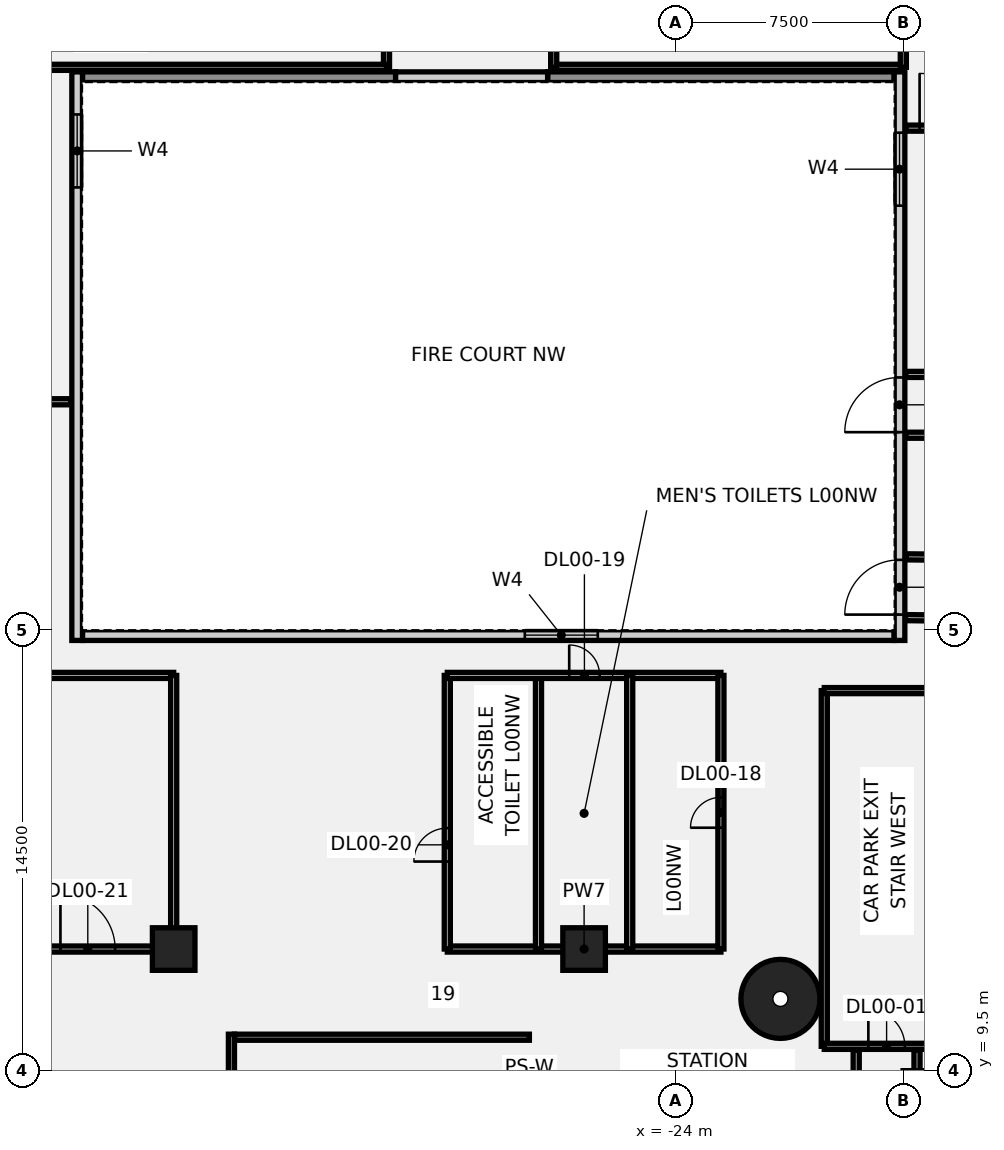
"""IFC4 building model, lengths in metres.
Left out: names, types, materials, properties, quantities, classifications, styles, units other than length and angle.
Written with IfcOpenShell. Run it as: python <this file> out.ifc"""

import sys

from ifc_helpers import new_model, si_unit, direction, frame, frame_2d, origin, origin_2d, place, context, subcontext, project, spatial, rectangle, circle, extrude, element, fill, save


model = new_model("IFC4")
c1 = context("Model", 3, precision=1e-05, world=origin(), true_north=direction((0.0, 1.0)))
c2 = subcontext(c1, "Body", "Model", "MODEL_VIEW")
j1 = project(units=[si_unit("LENGTHUNIT", "METRE"), si_unit("PLANEANGLEUNIT", "RADIAN")], contexts=[c1])
p1 = place(None, origin())
s1 = spatial("IfcSite", under=j1, at=p1, CompositionType="ELEMENT")
p2 = place(p1, origin())
s2 = spatial("IfcBuilding", under=s1, at=p2, CompositionType="ELEMENT")
p3 = place(p2, origin())
s3 = spatial("IfcBuildingStorey", under=s2, at=p3, CompositionType="ELEMENT", Elevation=0.0)
p4 = place(p3, frame((-20.543, 11.86, -0.55), z_axis=(0.0, 0.0, 1.0), x_axis=(1.0, 0.0, 0.0)))
e1 = element("IfcColumn", 1, at=p4, inside=s3, PredefinedType="COLUMN", context=c2, shape_type="SweptSolid", body=[
    extrude(circle(Radius=1.3, at=origin_2d()), origin(), (0.0, 0.0, 1.0), 9.05),
])
for number, where, z_axis, x_axis in (
    (2, (-40.5, 13.5, -0.55), (0.0, 0.0, 1.0), (1.0, 0.0, 0.0)),
    (3, (-27.0, 13.5, -0.55), (0.0, 0.0, 1.0), (1.0, 0.0, 0.0)),
):
    element("IfcColumn", number, at=place(p3, frame(where, z_axis=z_axis, x_axis=x_axis)), inside=s3, PredefinedType="COLUMN", context=c2, shape_type="SweptSolid", body=[
        extrude(rectangle(XDim=1.4, YDim=1.4, at=origin_2d()), origin(), (0.0, 0.0, 1.0), 9.05),
    ])
p5 = place(p3, frame((-33.5, 42.5, 0.0), z_axis=(0.0, 0.0, 1.0), x_axis=(0.0, 1.0, 0.0)))
e4 = element("IfcWall", 4, at=p5, inside=s3, PredefinedType="PARTITIONING", context=c2, shape_type="SweptSolid", body=[
    extrude(rectangle(XDim=3.9, YDim=0.2, at=frame_2d((1.95, 0.0))), origin(), (0.0, 0.0, 1.0), 8.5),
])
p6 = place(p3, frame((-45.0, 42.5, 0.0), z_axis=(0.0, 0.0, 1.0), x_axis=(1.0, 0.0, 0.0)))
e5 = element("IfcWall", 5, at=p6, inside=s3, PredefinedType="PARTITIONING", context=c2, shape_type="SweptSolid", body=[
    extrude(rectangle(XDim=11.5, YDim=0.2, at=frame_2d((5.75, 0.0))), origin(), (0.0, 0.0, 1.0), 8.5),
])
p7 = place(p3, frame((-19.1, 10.3, 0.0), z_axis=(0.0, 0.0, 1.0), x_axis=(0.0, 1.0, 0.0)))
e6 = element("IfcWall", 6, at=p7, inside=s3, PredefinedType="PARTITIONING", context=c2, shape_type="SweptSolid", body=[
    extrude(rectangle(XDim=11.7, YDim=0.2, at=frame_2d((5.85, 0.0))), origin(), (0.0, 0.0, 1.0), 8.5),
])
p8 = place(p3, frame((-19.1, 22.0, 0.0), z_axis=(0.0, 0.0, 1.0), x_axis=(1.0, 0.0, 0.0)))
e7 = element("IfcWall", 7, at=p8, inside=s3, PredefinedType="PARTITIONING", context=c2, shape_type="SweptSolid", body=[
    extrude(rectangle(XDim=4.1, YDim=0.2, at=frame_2d((2.05, 0.0))), origin(), (0.0, 0.0, 1.0), 8.5),
])
p9 = place(p3, frame((-19.1, 10.3, 0.0), z_axis=(0.0, 0.0, 1.0), x_axis=(1.0, 0.0, 0.0)))
e8 = element("IfcWall", 8, at=p9, inside=s3, PredefinedType="PARTITIONING", context=c2, shape_type="SweptSolid", body=[
    extrude(rectangle(XDim=4.1, YDim=0.2, at=frame_2d((2.05, 0.0))), origin(), (0.0, 0.0, 1.0), 8.5),
])
p10 = place(p9, frame((1.45, 0.0, 0.0)))
e9 = element("IfcOpeningElement", 9, at=p10, cuts=e8, PredefinedType="OPENING", context=c2, shape_type="SweptSolid", body=[
    extrude(rectangle(XDim=1.2, YDim=2.1, at=frame_2d((0.6, 1.05))), frame((0.0, 0.11, 0.0), z_axis=(0.0, -1.0, 0.0), x_axis=(1.0, 0.0, 0.0)), (0.0, 0.0, 1.0), 0.22),
])
p11 = place(p3, frame((-28.0, 42.5, 0.0), z_axis=(0.0, 0.0, 1.0), x_axis=(1.0, 0.0, 0.0)))
e10 = element("IfcWall", 10, at=p11, inside=s3, PredefinedType="PARTITIONING", context=c2, shape_type="SweptSolid", body=[
    extrude(rectangle(XDim=11.5, YDim=0.2, at=frame_2d((5.75, 0.0))), origin(), (0.0, 0.0, 1.0), 8.5),
])
for number, where, z_axis, x_axis in (
    (11, (-28.0, 42.5, 0.0), (0.0, 0.0, 1.0), (0.0, 1.0, 0.0)),
    (12, (-16.5, 42.5, 0.0), (0.0, 0.0, 1.0), (0.0, 1.0, 0.0)),
):
    element("IfcWall", number, at=place(p3, frame(where, z_axis=z_axis, x_axis=x_axis)), inside=s3, PredefinedType="PARTITIONING", context=c2, shape_type="SweptSolid", body=[
        extrude(rectangle(XDim=3.9, YDim=0.2, at=frame_2d((1.95, 0.0))), origin(), (0.0, 0.0, 1.0), 8.5),
    ])
p12 = place(p3, frame((-69.699, 13.5, 0.0), z_axis=(0.0, 0.0, 1.0), x_axis=(1.0, 0.0, 0.0)))
e13 = element("IfcWall", 13, at=p12, inside=s3, PredefinedType="PARTITIONING", context=c2, shape_type="SweptSolid", body=[
    extrude(rectangle(XDim=29.199, YDim=0.2, at=frame_2d((14.6, 0.0))), origin(), (0.0, 0.0, 1.0), 8.5),
])
p13 = place(p12, frame((25.474, 0.0, 0.0)))
e14 = element("IfcOpeningElement", 14, at=p13, cuts=e13, PredefinedType="OPENING", context=c2, shape_type="SweptSolid", body=[
    extrude(rectangle(XDim=1.8, YDim=2.1, at=frame_2d((0.9, 1.05))), frame((0.0, 0.11, 0.0), z_axis=(0.0, -1.0, 0.0), x_axis=(1.0, 0.0, 0.0)), (0.0, 0.0, 1.0), 0.22),
])
p14 = place(p12, frame((4.699, 0.0, 0.0)))
e15 = element("IfcOpeningElement", 15, at=p14, cuts=e13, PredefinedType="OPENING", context=c2, shape_type="SweptSolid", body=[
    extrude(rectangle(XDim=1.8, YDim=2.1, at=frame_2d((0.9, 1.05))), frame((0.0, 0.11, 0.0), z_axis=(0.0, -1.0, 0.0), x_axis=(1.0, 0.0, 0.0)), (0.0, 0.0, 1.0), 0.22),
])
p15 = place(p3, frame((-69.699, 31.5, 0.0), z_axis=(0.0, 0.0, 1.0), x_axis=(1.0, 0.0, 0.0)))
e16 = element("IfcWall", 16, at=p15, inside=s3, PredefinedType="PARTITIONING", context=c2, shape_type="SweptSolid", body=[
    extrude(rectangle(XDim=25.819, YDim=0.2, at=frame_2d((12.91, 0.0))), origin(), (0.0, 0.0, 1.0), 8.5),
])
p16 = place(p15, frame((12.034, 0.0, 0.0)))
e17 = element("IfcOpeningElement", 17, at=p16, cuts=e16, PredefinedType="OPENING", context=c2, shape_type="SweptSolid", body=[
    extrude(rectangle(XDim=1.8, YDim=2.1, at=frame_2d((0.9, 1.05))), frame((0.0, 0.11, 0.0), z_axis=(0.0, -1.0, 0.0), x_axis=(1.0, 0.0, 0.0)), (0.0, 0.0, 1.0), 0.22),
])
p17 = place(p3, frame((-50.6, 22.5, 0.0), z_axis=(0.0, 0.0, 1.0), x_axis=(1.0, 0.0, 0.0)))
e18 = element("IfcWall", 18, at=p17, inside=s3, PredefinedType="PARTITIONING", context=c2, shape_type="SweptSolid", body=[
    extrude(rectangle(XDim=10.1, YDim=0.2, at=frame_2d((5.05, 0.0))), origin(), (0.0, 0.0, 1.0), 8.5),
])
for number, where, z_axis, x_axis in (
    (19, (-40.5, 13.5, 0.0), (0.0, 0.0, 1.0), (0.0, 1.0, 0.0)),
    (20, (-31.5, 13.5, 0.0), (0.0, 0.0, 1.0), (1.0, 0.0, 0.0)),
    (21, (-28.5, 13.5, 0.0), (0.0, 0.0, 1.0), (0.0, 1.0, 0.0)),
):
    element("IfcWall", number, at=place(p3, frame(where, z_axis=z_axis, x_axis=x_axis)), inside=s3, PredefinedType="PARTITIONING", context=c2, shape_type="SweptSolid", body=[
        extrude(rectangle(XDim=9.0, YDim=0.2, at=frame_2d((4.5, 0.0))), origin(), (0.0, 0.0, 1.0), 8.5),
    ])
p18 = place(p3, frame((-31.5, 13.5, 0.0), z_axis=(0.0, 0.0, 1.0), x_axis=(0.0, 1.0, 0.0)))
e22 = element("IfcWall", 22, at=p18, inside=s3, PredefinedType="PARTITIONING", context=c2, shape_type="SweptSolid", body=[
    extrude(rectangle(XDim=9.0, YDim=0.2, at=frame_2d((4.5, 0.0))), origin(), (0.0, 0.0, 1.0), 8.5),
])
p19 = place(p18, frame((2.877, 0.0, 0.0)))
e23 = element("IfcOpeningElement", 23, at=p19, cuts=e22, PredefinedType="OPENING", context=c2, shape_type="SweptSolid", body=[
    extrude(rectangle(XDim=1.1, YDim=2.1, at=frame_2d((0.55, 1.05))), frame((0.0, 0.11, 0.0), z_axis=(0.0, -1.0, 0.0), x_axis=(1.0, 0.0, 0.0)), (0.0, 0.0, 1.0), 0.22),
])
p20 = place(p3, frame((-31.5, 22.5, 0.0), z_axis=(0.0, 0.0, 1.0), x_axis=(1.0, 0.0, 0.0)))
e24 = element("IfcWall", 24, at=p20, inside=s3, PredefinedType="PARTITIONING", context=c2, shape_type="SweptSolid", body=[
    extrude(rectangle(XDim=9.0, YDim=0.2, at=frame_2d((4.5, 0.0))), origin(), (0.0, 0.0, 1.0), 8.5),
])
p21 = place(p20, frame((4.01, 0.0, 0.0)))
e25 = element("IfcOpeningElement", 25, at=p21, cuts=e24, PredefinedType="OPENING", context=c2, shape_type="SweptSolid", body=[
    extrude(rectangle(XDim=1.0, YDim=2.1, at=frame_2d((0.5, 1.05))), frame((0.0, 0.11, 0.0), z_axis=(0.0, -1.0, 0.0), x_axis=(1.0, 0.0, 0.0)), (0.0, 0.0, 1.0), 0.22),
])
p22 = place(p3, frame((-22.5, 13.5, 0.0), z_axis=(0.0, 0.0, 1.0), x_axis=(0.0, 1.0, 0.0)))
e26 = element("IfcWall", 26, at=p22, inside=s3, PredefinedType="PARTITIONING", context=c2, shape_type="SweptSolid", body=[
    extrude(rectangle(XDim=9.0, YDim=0.2, at=frame_2d((4.5, 0.0))), origin(), (0.0, 0.0, 1.0), 8.5),
])
p23 = place(p22, frame((3.99, 0.0, 0.0)))
e27 = element("IfcOpeningElement", 27, at=p23, cuts=e26, PredefinedType="OPENING", context=c2, shape_type="SweptSolid", body=[
    extrude(rectangle(XDim=1.0, YDim=2.1, at=frame_2d((0.5, 1.05))), frame((0.0, 0.11, 0.0), z_axis=(0.0, -1.0, 0.0), x_axis=(1.0, 0.0, 0.0)), (0.0, 0.0, 1.0), 0.22),
])
p24 = place(p3, frame((-25.5, 13.5, 0.0), z_axis=(0.0, 0.0, 1.0), x_axis=(0.0, 1.0, 0.0)))
e28 = element("IfcWall", 28, at=p24, inside=s3, PredefinedType="PARTITIONING", context=c2, shape_type="SweptSolid", body=[
    extrude(rectangle(XDim=9.0, YDim=0.2, at=frame_2d((4.5, 0.0))), origin(), (0.0, 0.0, 1.0), 8.5),
])
p25 = place(p3, frame((-16.42, 40.5, 0.0), z_axis=(0.0, 0.0, 1.0), x_axis=(1.0, 0.0, 0.0)))
e29 = element("IfcWall", 29, at=p25, inside=s3, PredefinedType="PARTITIONING", context=c2, shape_type="SweptSolid", body=[
    extrude(rectangle(XDim=2.92, YDim=0.2, at=frame_2d((1.46, 0.0))), origin(), (0.0, 0.0, 1.0), 8.5),
])
p26 = place(p25, frame((0.455, 0.0, 0.0)))
e30 = element("IfcOpeningElement", 30, at=p26, cuts=e29, PredefinedType="OPENING", context=c2, shape_type="SweptSolid", body=[
    extrude(rectangle(XDim=1.8, YDim=2.1, at=frame_2d((0.9, 1.05))), frame((0.0, 0.11, 0.0), z_axis=(0.0, -1.0, 0.0), x_axis=(1.0, 0.0, 0.0)), (0.0, 0.0, 1.0), 0.22),
])
p27 = place(p3, frame((-7.007, 24.298, 0.0), z_axis=(0.0, 0.0, 1.0), x_axis=(-0.999941090537, 0.010854282822, 0.0)))
e31 = element("IfcWall", 31, at=p27, inside=s3, PredefinedType="PARTITIONING", context=c2, shape_type="SweptSolid", body=[
    extrude(rectangle(XDim=9.424, YDim=0.2, at=frame_2d((4.712, 0.0))), origin(), (0.0, 0.0, 1.0), 8.5),
])
p28 = place(p3, frame((-7.393, 26.302, 0.0), z_axis=(0.0, 0.0, 1.0), x_axis=(-0.99994134978, 0.010830373938, 0.0)))
e32 = element("IfcWall", 32, at=p28, inside=s3, PredefinedType="PARTITIONING", context=c2, shape_type="SweptSolid", body=[
    extrude(rectangle(XDim=9.017, YDim=0.2, at=frame_2d((4.508, 0.0))), origin(), (0.0, 0.0, 1.0), 8.5),
])
p29 = place(p3, frame((-13.22, 30.4, 0.0), z_axis=(0.0, 0.0, 1.0), x_axis=(-1.0, 0.0, 0.0)))
e33 = element("IfcWall", 33, at=p29, inside=s3, PredefinedType="PARTITIONING", context=c2, shape_type="SweptSolid", body=[
    extrude(rectangle(XDim=3.2, YDim=0.2, at=frame_2d((1.6, 0.0))), origin(), (0.0, 0.0, 1.0), 8.5),
])
p30 = place(p3, frame((-14.21, 32.4, 0.0), z_axis=(0.0, 0.0, 1.0), x_axis=(-1.0, 0.0, 0.0)))
e34 = element("IfcWall", 34, at=p30, inside=s3, PredefinedType="PARTITIONING", context=c2, shape_type="SweptSolid", body=[
    extrude(rectangle(XDim=2.21, YDim=0.2, at=frame_2d((1.105, 0.0))), origin(), (0.0, 0.0, 1.0), 8.5),
])
p31 = place(p3, frame((-16.05, 10.18, 0.0), z_axis=(0.0, 0.0, 1.0), x_axis=(0.0, -1.0, 0.0)))
e35 = element("IfcWall", 35, at=p31, inside=s3, PredefinedType="PARTITIONING", context=c2, shape_type="SweptSolid", body=[
    extrude(rectangle(XDim=0.68, YDim=0.2, at=frame_2d((0.34, 0.0))), origin(), (0.0, 0.0, 1.0), 8.5),
])
p32 = place(p3, frame((-18.05, 10.18, 0.0), z_axis=(0.0, 0.0, 1.0), x_axis=(0.0, -1.0, 0.0)))
e36 = element("IfcWall", 36, at=p32, inside=s3, PredefinedType="PARTITIONING", context=c2, shape_type="SweptSolid", body=[
    extrude(rectangle(XDim=2.055, YDim=0.2, at=frame_2d((1.028, 0.0))), origin(), (0.0, 0.0, 1.0), 8.5),
])
p33 = place(p3, frame((-28.8, 10.6, 0.0), z_axis=(0.0, 0.0, 1.0), x_axis=(-1.0, 0.0, 0.0)))
e37 = element("IfcWall", 37, at=p33, inside=s3, PredefinedType="SOLIDWALL", context=c2, shape_type="SweptSolid", body=[
    extrude(rectangle(XDim=9.7, YDim=0.2, at=frame_2d((4.85, 0.0))), origin(), (0.0, 0.0, 1.0), 8.5),
])
p34 = place(p3, frame((-38.6, 10.7, 0.0), z_axis=(0.0, 0.0, 1.0), x_axis=(0.0, -1.0, 0.0)))
e38 = element("IfcWall", 38, at=p34, inside=s3, PredefinedType="SOLIDWALL", context=c2, shape_type="SweptSolid", body=[
    extrude(rectangle(XDim=4.3, YDim=0.2, at=frame_2d((2.15, 0.0))), origin(), (0.0, 0.0, 1.0), 8.5),
])
p35 = place(p3, frame((-43.5, 23.825, 0.0), z_axis=(0.0, 0.0, 1.0), x_axis=(1.0, 0.0, 0.0)))
e39 = element("IfcWall", 39, at=p35, inside=s3, PredefinedType="SOLIDWALL", context=c2, shape_type="SweptSolid", body=[
    extrude(rectangle(XDim=26.7, YDim=0.35, at=frame_2d((13.35, 0.0))), origin(), (0.0, 0.0, 1.0), 8.5),
])
p36 = place(p35, frame((14.55, 0.0, 1.0)))
e40 = element("IfcOpeningElement", 40, at=p36, cuts=e39, PredefinedType="OPENING", context=c2, shape_type="SweptSolid", body=[
    extrude(rectangle(XDim=2.4, YDim=1.8, at=frame_2d((1.2, 0.9))), frame((0.0, 0.185, 0.0), z_axis=(0.0, -1.0, 0.0), x_axis=(1.0, 0.0, 0.0)), (0.0, 0.0, 1.0), 0.37),
])
p37 = place(p3, frame((-43.5, 42.175, 0.0), z_axis=(0.0, 0.0, 1.0), x_axis=(1.0, 0.0, 0.0)))
e41 = element("IfcWall", 41, at=p37, inside=s3, PredefinedType="SOLIDWALL", context=c2, shape_type="SweptSolid", body=[
    extrude(rectangle(XDim=10.3, YDim=0.35, at=frame_2d((5.15, 0.0))), origin(), (0.0, 0.0, 1.0), 8.5),
])
p38 = place(p3, frame((-28.2, 42.175, 0.0), z_axis=(0.0, 0.0, 1.0), x_axis=(1.0, 0.0, 0.0)))
e42 = element("IfcWall", 42, at=p38, inside=s3, PredefinedType="SOLIDWALL", context=c2, shape_type="SweptSolid", body=[
    extrude(rectangle(XDim=11.4, YDim=0.35, at=frame_2d((5.7, 0.0))), origin(), (0.0, 0.0, 1.0), 8.5),
])
p39 = place(p3, frame((-33.2, 42.175, 4.9), z_axis=(0.0, 0.0, 1.0), x_axis=(1.0, 0.0, 0.0)))
e43 = element("IfcWall", 43, at=p39, inside=s3, PredefinedType="SOLIDWALL", context=c2, shape_type="SweptSolid", body=[
    extrude(rectangle(XDim=5.0, YDim=0.35, at=frame_2d((2.5, 0.0))), origin(), (0.0, 0.0, 1.0), 3.6),
])
p40 = place(p3, frame((-43.675, 23.65, 0.0), z_axis=(0.0, 0.0, 1.0), x_axis=(0.0, 1.0, 0.0)))
e44 = element("IfcWall", 44, at=p40, inside=s3, PredefinedType="SOLIDWALL", context=c2, shape_type="SweptSolid", body=[
    extrude(rectangle(XDim=18.7, YDim=0.35, at=frame_2d((9.35, 0.0))), origin(), (0.0, 0.0, 1.0), 8.5),
])
p41 = place(p40, frame((14.9, 0.0, 1.0)))
e45 = element("IfcOpeningElement", 45, at=p41, cuts=e44, PredefinedType="OPENING", context=c2, shape_type="SweptSolid", body=[
    extrude(rectangle(XDim=2.4, YDim=1.8, at=frame_2d((1.2, 0.9))), frame((0.0, 0.185, 0.0), z_axis=(0.0, -1.0, 0.0), x_axis=(1.0, 0.0, 0.0)), (0.0, 0.0, 1.0), 0.37),
])
p42 = place(p3, frame((-16.625, 23.65, 0.0), z_axis=(0.0, 0.0, 1.0), x_axis=(0.0, 1.0, 0.0)))
e46 = element("IfcWall", 46, at=p42, inside=s3, PredefinedType="SOLIDWALL", context=c2, shape_type="SweptSolid", body=[
    extrude(rectangle(XDim=18.7, YDim=0.35, at=frame_2d((9.35, 0.0))), origin(), (0.0, 0.0, 1.0), 8.5),
])
p43 = place(p42, frame((0.85, 0.0, 0.0)))
e47 = element("IfcOpeningElement", 47, at=p43, cuts=e46, PredefinedType="OPENING", context=c2, shape_type="SweptSolid", body=[
    extrude(rectangle(XDim=1.8, YDim=2.4, at=frame_2d((0.9, 1.2))), frame((0.0, 0.185, 0.0), z_axis=(0.0, -1.0, 0.0), x_axis=(1.0, 0.0, 0.0)), (0.0, 0.0, 1.0), 0.37),
])
p44 = place(p42, frame((6.85, 0.0, 0.0)))
e48 = element("IfcOpeningElement", 48, at=p44, cuts=e46, PredefinedType="OPENING", context=c2, shape_type="SweptSolid", body=[
    extrude(rectangle(XDim=1.8, YDim=2.4, at=frame_2d((0.9, 1.2))), frame((0.0, 0.185, 0.0), z_axis=(0.0, -1.0, 0.0), x_axis=(1.0, 0.0, 0.0)), (0.0, 0.0, 1.0), 0.37),
])
p45 = place(p42, frame((14.3, 0.0, 1.0)))
e49 = element("IfcOpeningElement", 49, at=p45, cuts=e46, PredefinedType="OPENING", context=c2, shape_type="SweptSolid", body=[
    extrude(rectangle(XDim=2.4, YDim=1.8, at=frame_2d((1.2, 0.9))), frame((0.0, 0.185, 0.0), z_axis=(0.0, -1.0, 0.0), x_axis=(1.0, 0.0, 0.0)), (0.0, 0.0, 1.0), 0.37),
])
p46 = place(p10, origin())
e50 = element("IfcDoor", 50, at=p46, inside=s3, OperationType="SINGLE_SWING_LEFT", PredefinedType="DOOR", context=c2, shape_type="SweptSolid", body=[
    extrude(rectangle(XDim=1.2, YDim=2.1, at=frame_2d((0.6, 1.05))), frame((0.0, 0.025, 0.0), z_axis=(0.0, -1.0, 0.0), x_axis=(1.0, 0.0, 0.0)), (0.0, 0.0, 1.0), 0.05),
])
fill(e9, e50)
p47 = place(p23, origin())
e51 = element("IfcDoor", 51, at=p47, inside=s3, OperationType="SINGLE_SWING_RIGHT", PredefinedType="DOOR", context=c2, shape_type="SweptSolid", body=[
    extrude(rectangle(XDim=1.0, YDim=2.1, at=frame_2d((0.5, 1.05))), frame((0.0, 0.025, 0.0), z_axis=(0.0, -1.0, 0.0), x_axis=(1.0, 0.0, 0.0)), (0.0, 0.0, 1.0), 0.05),
])
fill(e27, e51)
p48 = place(p21, origin())
e52 = element("IfcDoor", 52, at=p48, inside=s3, OperationType="SINGLE_SWING_LEFT", PredefinedType="DOOR", context=c2, shape_type="SweptSolid", body=[
    extrude(rectangle(XDim=1.0, YDim=2.1, at=frame_2d((0.5, 1.05))), frame((0.0, 0.025, 0.0), z_axis=(0.0, -1.0, 0.0), x_axis=(1.0, 0.0, 0.0)), (0.0, 0.0, 1.0), 0.05),
])
fill(e25, e52)
p49 = place(p19, origin())
e53 = element("IfcDoor", 53, at=p49, inside=s3, OperationType="SINGLE_SWING_RIGHT", PredefinedType="DOOR", context=c2, shape_type="SweptSolid", body=[
    extrude(rectangle(XDim=1.1, YDim=2.1, at=frame_2d((0.55, 1.05))), frame((0.0, 0.025, 0.0), z_axis=(0.0, -1.0, 0.0), x_axis=(1.0, 0.0, 0.0)), (0.0, 0.0, 1.0), 0.05),
])
fill(e23, e53)
p50 = place(p13, origin())
e54 = element("IfcDoor", 54, at=p50, inside=s3, OperationType="SINGLE_SWING_LEFT", PredefinedType="DOOR", context=c2, shape_type="SweptSolid", body=[
    extrude(rectangle(XDim=1.8, YDim=2.1, at=frame_2d((0.9, 1.05))), frame((0.0, 0.025, 0.0), z_axis=(0.0, -1.0, 0.0), x_axis=(1.0, 0.0, 0.0)), (0.0, 0.0, 1.0), 0.05),
])
fill(e14, e54)
p51 = place(p26, origin())
e55 = element("IfcDoor", 55, at=p51, inside=s3, OperationType="SINGLE_SWING_RIGHT", PredefinedType="DOOR", context=c2, shape_type="SweptSolid", body=[
    extrude(rectangle(XDim=1.8, YDim=2.1, at=frame_2d((0.9, 1.05))), frame((0.0, 0.025, 0.0), z_axis=(0.0, -1.0, 0.0), x_axis=(1.0, 0.0, 0.0)), (0.0, 0.0, 1.0), 0.05),
])
fill(e30, e55)
p52 = place(p36, origin())
e56 = element("IfcWindow", 56, at=p52, inside=s3, PartitioningType="SINGLE_PANEL", PredefinedType="WINDOW", context=c2, shape_type="SweptSolid", body=[
    extrude(rectangle(XDim=2.4, YDim=1.8, at=frame_2d((1.2, 0.9))), frame((0.0, 0.03, 0.0), z_axis=(0.0, -1.0, 0.0), x_axis=(1.0, 0.0, 0.0)), (0.0, 0.0, 1.0), 0.06),
])
fill(e40, e56)
p53 = place(p41, origin())
e57 = element("IfcWindow", 57, at=p53, inside=s3, PartitioningType="SINGLE_PANEL", PredefinedType="WINDOW", context=c2, shape_type="SweptSolid", body=[
    extrude(rectangle(XDim=2.4, YDim=1.8, at=frame_2d((1.2, 0.9))), frame((0.0, 0.03, 0.0), z_axis=(0.0, -1.0, 0.0), x_axis=(1.0, 0.0, 0.0)), (0.0, 0.0, 1.0), 0.06),
])
fill(e45, e57)
p54 = place(p43, origin())
e58 = element("IfcDoor", 58, at=p54, inside=s3, OperationType="SINGLE_SWING_LEFT", PredefinedType="DOOR", context=c2, shape_type="SweptSolid", body=[
    extrude(rectangle(XDim=1.8, YDim=2.4, at=frame_2d((0.9, 1.2))), frame((0.0, 0.025, 0.0), z_axis=(0.0, -1.0, 0.0), x_axis=(1.0, 0.0, 0.0)), (0.0, 0.0, 1.0), 0.05),
])
fill(e47, e58)
p55 = place(p44, origin())
e59 = element("IfcDoor", 59, at=p55, inside=s3, OperationType="SINGLE_SWING_LEFT", PredefinedType="DOOR", context=c2, shape_type="SweptSolid", body=[
    extrude(rectangle(XDim=1.8, YDim=2.4, at=frame_2d((0.9, 1.2))), frame((0.0, 0.025, 0.0), z_axis=(0.0, -1.0, 0.0), x_axis=(1.0, 0.0, 0.0)), (0.0, 0.0, 1.0), 0.05),
])
fill(e48, e59)
p56 = place(p45, origin())
e60 = element("IfcWindow", 60, at=p56, inside=s3, PartitioningType="SINGLE_PANEL", PredefinedType="WINDOW", context=c2, shape_type="SweptSolid", body=[
    extrude(rectangle(XDim=2.4, YDim=1.8, at=frame_2d((1.2, 0.9))), frame((0.0, 0.03, 0.0), z_axis=(0.0, -1.0, 0.0), x_axis=(1.0, 0.0, 0.0)), (0.0, 0.0, 1.0), 0.06),
])
fill(e49, e60)
save(model, sys.argv[1])
